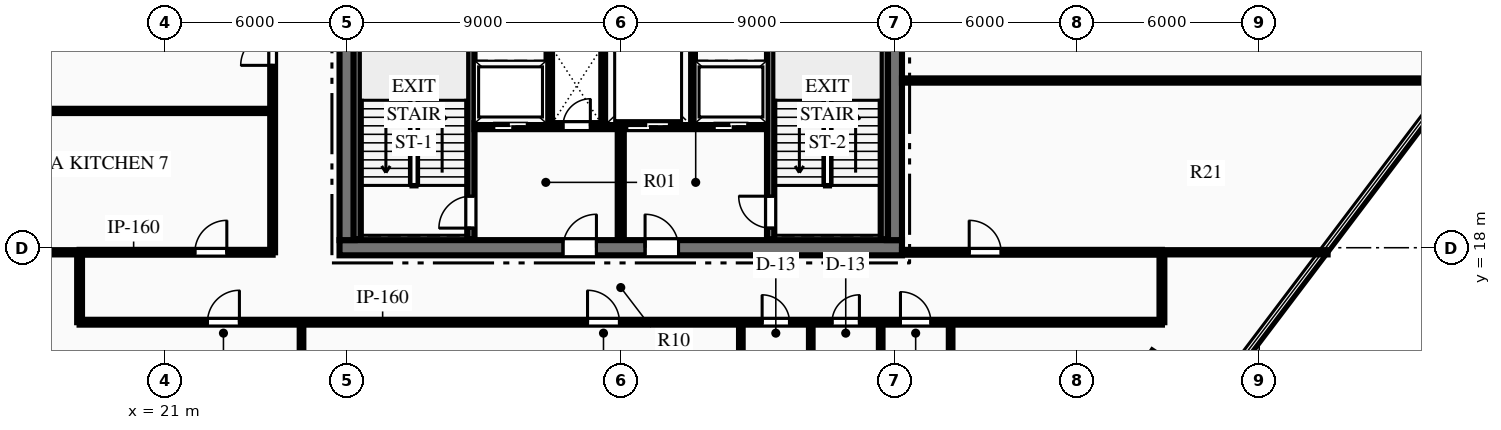
"""IFC4 building model, lengths in metres.
Left out: names, types, materials, properties, quantities, classifications, styles, units other than length and angle.
Written with IfcOpenShell. Run it as: python <this file> out.ifc"""

import sys

from ifc_helpers import new_model, si_unit, direction, frame, frame_2d, origin, place, context, subcontext, project, spatial, rectangle, extrude, element, fill, save


model = new_model("IFC4")
c1 = context("Model", 3, precision=1e-05, world=origin(), true_north=direction((0.0, 1.0)))
c2 = subcontext(c1, "Body", "Model", "MODEL_VIEW")
j1 = project(units=[si_unit("LENGTHUNIT", "METRE"), si_unit("PLANEANGLEUNIT", "RADIAN")], contexts=[c1])
p1 = place(None, origin())
s1 = spatial("IfcSite", under=j1, at=p1, CompositionType="ELEMENT")
p2 = place(p1, origin())
s2 = spatial("IfcBuilding", under=s1, at=p2, CompositionType="ELEMENT")
p3 = place(p2, frame((0.0, 0.0, 205.95)))
s3 = spatial("IfcBuildingStorey", under=s2, at=p3, CompositionType="ELEMENT", Elevation=205.95)
p4 = place(p3, frame((26.75, 18.0, 0.0), z_axis=(0.0, 0.0, 1.0), x_axis=(1.0, 0.0, 0.0)))
e1 = element("IfcWall", 1, at=p4, inside=s3, PredefinedType="SHEAR", context=c2, shape_type="SweptSolid", body=[
    extrude(rectangle(XDim=18.5, YDim=0.5, at=frame_2d((9.25, 0.0))), origin(), (0.0, 0.0, 1.0), 3.75),
])
p5 = place(p4, frame((7.35, 0.0, 0.0)))
e2 = element("IfcOpeningElement", 2, at=p5, cuts=e1, PredefinedType="OPENING", context=c2, shape_type="SweptSolid", body=[
    extrude(rectangle(XDim=1.1, YDim=2.15, at=frame_2d((0.55, 1.075))), frame((0.0, 0.26, 0.0), z_axis=(0.0, -1.0, 0.0), x_axis=(1.0, 0.0, 0.0)), (0.0, 0.0, 1.0), 0.52),
])
p6 = place(p4, frame((10.05, 0.0, 0.0)))
e3 = element("IfcOpeningElement", 3, at=p6, cuts=e1, PredefinedType="OPENING", context=c2, shape_type="SweptSolid", body=[
    extrude(rectangle(XDim=1.1, YDim=2.15, at=frame_2d((0.55, 1.075))), frame((0.0, 0.26, 0.0), z_axis=(0.0, -1.0, 0.0), x_axis=(1.0, 0.0, 0.0)), (0.0, 0.0, 1.0), 0.52),
])
p7 = place(p3, frame((27.0, 18.25, 0.0), z_axis=(0.0, 0.0, 1.0), x_axis=(0.0, 1.0, 0.0)))
e4 = element("IfcWall", 4, at=p7, inside=s3, PredefinedType="SHEAR", context=c2, shape_type="SweptSolid", body=[
    extrude(rectangle(XDim=15.5, YDim=0.5, at=frame_2d((7.75, 0.0))), origin(), (0.0, 0.0, 1.0), 3.75),
])
p8 = place(p7, frame((9.99, 0.0, 0.0)))
e5 = element("IfcOpeningElement", 5, at=p8, cuts=e4, PredefinedType="OPENING", context=c2, shape_type="SweptSolid", body=[
    extrude(rectangle(XDim=1.4, YDim=2.2, at=frame_2d((0.7, 1.1))), frame((0.0, 0.26, 0.0), z_axis=(0.0, -1.0, 0.0), x_axis=(1.0, 0.0, 0.0)), (0.0, 0.0, 1.0), 0.52),
])
p9 = place(p3, frame((45.0, 18.25, 0.0), z_axis=(0.0, 0.0, 1.0), x_axis=(0.0, 1.0, 0.0)))
e6 = element("IfcWall", 6, at=p9, inside=s3, PredefinedType="SHEAR", context=c2, shape_type="SweptSolid", body=[
    extrude(rectangle(XDim=15.5, YDim=0.5, at=frame_2d((7.75, 0.0))), origin(), (0.0, 0.0, 1.0), 3.75),
])
p10 = place(p9, frame((9.99, 0.0, 0.0)))
e7 = element("IfcOpeningElement", 7, at=p10, cuts=e6, PredefinedType="OPENING", context=c2, shape_type="SweptSolid", body=[
    extrude(rectangle(XDim=1.4, YDim=2.2, at=frame_2d((0.7, 1.1))), frame((0.0, 0.26, 0.0), z_axis=(0.0, -1.0, 0.0), x_axis=(1.0, 0.0, 0.0)), (0.0, 0.0, 1.0), 0.52),
])
p11 = place(p3, frame((31.07, 18.28, 0.0), z_axis=(0.0, 0.0, 1.0), x_axis=(0.0, 1.0, 0.0)))
e8 = element("IfcWall", 8, at=p11, inside=s3, PredefinedType="SHEAR", context=c2, shape_type="SweptSolid", body=[
    extrude(rectangle(XDim=8.26, YDim=0.24, at=frame_2d((4.13, 0.0))), origin(), (0.0, 0.0, 1.0), 3.75),
])
p12 = place(p11, frame((0.365, 0.0, 0.0)))
e9 = element("IfcOpeningElement", 9, at=p12, cuts=e8, PredefinedType="OPENING", context=c2, shape_type="SweptSolid", body=[
    extrude(rectangle(XDim=1.05, YDim=2.15, at=frame_2d((0.525, 1.075))), frame((0.0, 0.13, 0.0), z_axis=(0.0, -1.0, 0.0), x_axis=(1.0, 0.0, 0.0)), (0.0, 0.0, 1.0), 0.26),
])
p13 = place(p3, frame((27.33, 18.28, 0.0), z_axis=(0.0, 0.0, 1.0), x_axis=(0.0, 1.0, 0.0)))
e10 = element("IfcWall", 10, at=p13, inside=s3, PredefinedType="SHEAR", context=c2, shape_type="SweptSolid", body=[
    extrude(rectangle(XDim=8.26, YDim=0.24, at=frame_2d((4.13, 0.0))), origin(), (0.0, 0.0, 1.0), 3.75),
])
p14 = place(p3, frame((40.93, 18.28, 0.0), z_axis=(0.0, 0.0, 1.0), x_axis=(0.0, 1.0, 0.0)))
e11 = element("IfcWall", 11, at=p14, inside=s3, PredefinedType="SHEAR", context=c2, shape_type="SweptSolid", body=[
    extrude(rectangle(XDim=8.26, YDim=0.24, at=frame_2d((4.13, 0.0))), origin(), (0.0, 0.0, 1.0), 3.75),
])
p15 = place(p14, frame((0.365, 0.0, 0.0)))
e12 = element("IfcOpeningElement", 12, at=p15, cuts=e11, PredefinedType="OPENING", context=c2, shape_type="SweptSolid", body=[
    extrude(rectangle(XDim=1.05, YDim=2.15, at=frame_2d((0.525, 1.075))), frame((0.0, 0.13, 0.0), z_axis=(0.0, -1.0, 0.0), x_axis=(1.0, 0.0, 0.0)), (0.0, 0.0, 1.0), 0.26),
])
p16 = place(p3, frame((44.67, 18.28, 0.0), z_axis=(0.0, 0.0, 1.0), x_axis=(0.0, 1.0, 0.0)))
e13 = element("IfcWall", 13, at=p16, inside=s3, PredefinedType="SHEAR", context=c2, shape_type="SweptSolid", body=[
    extrude(rectangle(XDim=8.26, YDim=0.24, at=frame_2d((4.13, 0.0))), origin(), (0.0, 0.0, 1.0), 3.75),
])
p17 = place(p3, frame((36.0, 18.28, 0.0), z_axis=(0.0, 0.0, 1.0), x_axis=(0.0, 1.0, 0.0)))
e14 = element("IfcWall", 14, at=p17, inside=s3, PredefinedType="PARTITIONING", context=c2, shape_type="SweptSolid", body=[
    extrude(rectangle(XDim=3.77, YDim=0.2, at=frame_2d((1.885, 0.0))), origin(), (0.0, 0.0, 1.0), 3.47),
])
p18 = place(p3, frame((31.19, 22.0, 0.0), z_axis=(0.0, 0.0, 1.0), x_axis=(1.0, 0.0, 0.0)))
e15 = element("IfcWall", 15, at=p18, inside=s3, PredefinedType="PARTITIONING", context=c2, shape_type="SweptSolid", body=[
    extrude(rectangle(XDim=4.69, YDim=0.2, at=frame_2d((2.345, 0.0))), origin(), (0.0, 0.0, 1.0), 3.47),
])
p19 = place(p18, frame((2.91, 0.0, 0.0)))
e16 = element("IfcOpeningElement", 16, at=p19, cuts=e15, PredefinedType="OPENING", context=c2, shape_type="SweptSolid", body=[
    extrude(rectangle(XDim=0.9, YDim=2.15, at=frame_2d((0.45, 1.075))), frame((0.0, 0.11, 0.0), z_axis=(0.0, -1.0, 0.0), x_axis=(1.0, 0.0, 0.0)), (0.0, 0.0, 1.0), 0.22),
])
p20 = place(p18, frame((0.635, 0.0, 0.0)))
e17 = element("IfcOpeningElement", 17, at=p20, cuts=e15, PredefinedType="OPENING", context=c2, shape_type="SweptSolid", body=[
    extrude(rectangle(XDim=1.1, YDim=2.15, at=frame_2d((0.55, 1.075))), frame((0.0, 0.11, 0.0), z_axis=(0.0, -1.0, 0.0), x_axis=(1.0, 0.0, 0.0)), (0.0, 0.0, 1.0), 0.22),
])
p21 = place(p3, frame((36.12, 22.0, 0.0), z_axis=(0.0, 0.0, 1.0), x_axis=(1.0, 0.0, 0.0)))
e18 = element("IfcWall", 18, at=p21, inside=s3, PredefinedType="PARTITIONING", context=c2, shape_type="SweptSolid", body=[
    extrude(rectangle(XDim=4.69, YDim=0.2, at=frame_2d((2.345, 0.0))), origin(), (0.0, 0.0, 1.0), 3.47),
])
p22 = place(p21, frame((2.955, 0.0, 0.0)))
e19 = element("IfcOpeningElement", 19, at=p22, cuts=e18, PredefinedType="OPENING", context=c2, shape_type="SweptSolid", body=[
    extrude(rectangle(XDim=1.1, YDim=2.15, at=frame_2d((0.55, 1.075))), frame((0.0, 0.11, 0.0), z_axis=(0.0, -1.0, 0.0), x_axis=(1.0, 0.0, 0.0)), (0.0, 0.0, 1.0), 0.22),
])
p23 = place(p21, frame((0.08, 0.0, 0.0)))
e20 = element("IfcOpeningElement", 20, at=p23, cuts=e18, PredefinedType="OPENING", context=c2, shape_type="SweptSolid", body=[
    extrude(rectangle(XDim=1.4, YDim=2.2, at=frame_2d((0.7, 1.1))), frame((0.0, 0.11, 0.0), z_axis=(0.0, -1.0, 0.0), x_axis=(1.0, 0.0, 0.0)), (0.0, 0.0, 1.0), 0.22),
])
for number, where, z_axis, x_axis in (
    (21, (33.65, 22.05, 0.0), (0.0, 0.0, 1.0), (0.0, 1.0, 0.0)),
    (22, (35.45, 22.05, 0.0), (0.0, 0.0, 1.0), (0.0, 1.0, 0.0)),
    (23, (38.35, 22.05, 0.0), (0.0, 0.0, 1.0), (0.0, 1.0, 0.0)),
):
    element("IfcWall", number, at=place(p3, frame(where, z_axis=z_axis, x_axis=x_axis)), inside=s3, PredefinedType="PARTITIONING", context=c2, shape_type="SweptSolid", body=[
        extrude(rectangle(XDim=2.6, YDim=0.18, at=frame_2d((1.3, 0.0))), origin(), (0.0, 0.0, 1.0), 3.47),
    ])
p24 = place(p3, frame((18.2, 15.55, 0.0), z_axis=(0.0, 0.0, 1.0), x_axis=(1.0, 0.0, 0.0)))
e24 = element("IfcWall", 24, at=p24, inside=s3, PredefinedType="PARTITIONING", context=c2, shape_type="SweptSolid", body=[
    extrude(rectangle(XDim=35.6, YDim=0.16, at=frame_2d((17.8, 0.0))), origin(), (0.0, 0.0, 1.0), 2.849),
])
p25 = place(p24, frame((22.45, 0.0, 0.0)))
e25 = element("IfcOpeningElement", 25, at=p25, cuts=e24, PredefinedType="OPENING", context=c2, shape_type="SweptSolid", body=[
    extrude(rectangle(XDim=0.9, YDim=2.15, at=frame_2d((0.45, 1.075))), frame((0.0, 0.09, 0.0), z_axis=(0.0, -1.0, 0.0), x_axis=(1.0, 0.0, 0.0)), (0.0, 0.0, 1.0), 0.18),
])
p26 = place(p24, frame((24.75, 0.0, 0.0)))
e26 = element("IfcOpeningElement", 26, at=p26, cuts=e24, PredefinedType="OPENING", context=c2, shape_type="SweptSolid", body=[
    extrude(rectangle(XDim=0.9, YDim=2.15, at=frame_2d((0.45, 1.075))), frame((0.0, 0.09, 0.0), z_axis=(0.0, -1.0, 0.0), x_axis=(1.0, 0.0, 0.0)), (0.0, 0.0, 1.0), 0.18),
])
p27 = place(p24, frame((27.0, 0.0, 0.0)))
e27 = element("IfcOpeningElement", 27, at=p27, cuts=e24, PredefinedType="OPENING", context=c2, shape_type="SweptSolid", body=[
    extrude(rectangle(XDim=1.0, YDim=2.15, at=frame_2d((0.5, 1.075))), frame((0.0, 0.09, 0.0), z_axis=(0.0, -1.0, 0.0), x_axis=(1.0, 0.0, 0.0)), (0.0, 0.0, 1.0), 0.18),
])
p28 = place(p24, frame((4.207, 0.0, 0.0)))
e28 = element("IfcOpeningElement", 28, at=p28, cuts=e24, PredefinedType="OPENING", context=c2, shape_type="SweptSolid", body=[
    extrude(rectangle(XDim=1.05, YDim=2.15, at=frame_2d((0.525, 1.075))), frame((0.0, 0.09, 0.0), z_axis=(0.0, -1.0, 0.0), x_axis=(1.0, 0.0, 0.0)), (0.0, 0.0, 1.0), 0.18),
])
p29 = place(p24, frame((16.707, 0.0, 0.0)))
e29 = element("IfcOpeningElement", 29, at=p29, cuts=e24, PredefinedType="OPENING", context=c2, shape_type="SweptSolid", body=[
    extrude(rectangle(XDim=1.05, YDim=2.15, at=frame_2d((0.525, 1.075))), frame((0.0, 0.09, 0.0), z_axis=(0.0, -1.0, 0.0), x_axis=(1.0, 0.0, 0.0)), (0.0, 0.0, 1.0), 0.18),
])
p30 = place(p3, frame((18.2, 17.85, 0.0), z_axis=(0.0, 0.0, 1.0), x_axis=(1.0, 0.0, 0.0)))
e30 = element("IfcWall", 30, at=p30, inside=s3, PredefinedType="PARTITIONING", context=c2, shape_type="SweptSolid", body=[
    extrude(rectangle(XDim=6.35, YDim=0.16, at=frame_2d((3.175, 0.0))), origin(), (0.0, 0.0, 1.0), 3.47),
])
p31 = place(p30, frame((3.793, 0.0, 0.0)))
e31 = element("IfcOpeningElement", 31, at=p31, cuts=e30, PredefinedType="OPENING", context=c2, shape_type="SweptSolid", body=[
    extrude(rectangle(XDim=1.05, YDim=2.15, at=frame_2d((0.525, 1.075))), frame((0.0, 0.09, 0.0), z_axis=(0.0, -1.0, 0.0), x_axis=(1.0, 0.0, 0.0)), (0.0, 0.0, 1.0), 0.18),
])
p32 = place(p3, frame((45.25, 17.85, 0.0), z_axis=(0.0, 0.0, 1.0), x_axis=(1.0, 0.0, 0.0)))
e32 = element("IfcWall", 32, at=p32, inside=s3, PredefinedType="PARTITIONING", context=c2, shape_type="SweptSolid", body=[
    extrude(rectangle(XDim=8.55, YDim=0.16, at=frame_2d((4.275, 0.0))), origin(), (0.0, 0.0, 1.0), 3.47),
])
p33 = place(p32, frame((2.211, 0.0, 0.0)))
e33 = element("IfcOpeningElement", 33, at=p33, cuts=e32, PredefinedType="OPENING", context=c2, shape_type="SweptSolid", body=[
    extrude(rectangle(XDim=1.05, YDim=2.15, at=frame_2d((0.525, 1.075))), frame((0.0, 0.09, 0.0), z_axis=(0.0, -1.0, 0.0), x_axis=(1.0, 0.0, 0.0)), (0.0, 0.0, 1.0), 0.18),
])
p34 = place(p3, frame((24.55, 17.85, 0.0), z_axis=(0.0, 0.0, 1.0), x_axis=(0.0, 1.0, 0.0)))
e34 = element("IfcWall", 34, at=p34, inside=s3, PredefinedType="PARTITIONING", context=c2, shape_type="SweptSolid", body=[
    extrude(rectangle(XDim=16.3, YDim=0.16, at=frame_2d((8.15, 0.0))), origin(), (0.0, 0.0, 1.0), 3.47),
])
p35 = place(p34, frame((6.149, 0.0, 0.0)))
e35 = element("IfcOpeningElement", 35, at=p35, cuts=e34, PredefinedType="OPENING", context=c2, shape_type="SweptSolid", body=[
    extrude(rectangle(XDim=1.05, YDim=2.15, at=frame_2d((0.525, 1.075))), frame((0.0, 0.09, 0.0), z_axis=(0.0, -1.0, 0.0), x_axis=(1.0, 0.0, 0.0)), (0.0, 0.0, 1.0), 0.18),
])
for number, where, z_axis, x_axis in (
    (36, (18.2, 15.55, 0.0), (0.0, 0.0, 1.0), (0.0, 1.0, 0.0)),
    (37, (53.8, 15.55, 0.0), (0.0, 0.0, 1.0), (0.0, 1.0, 0.0)),
):
    element("IfcWall", number, at=place(p3, frame(where, z_axis=z_axis, x_axis=x_axis)), inside=s3, PredefinedType="PARTITIONING", context=c2, shape_type="SweptSolid", body=[
        extrude(rectangle(XDim=2.3, YDim=0.16, at=frame_2d((1.15, 0.0))), origin(), (0.0, 0.0, 1.0), 3.47),
    ])
for number, where, z_axis, x_axis in (
    (38, (39.95, 11.65, 0.0), (0.0, 0.0, 1.0), (0.0, 1.0, 0.0)),
    (39, (42.25, 11.65, 0.0), (0.0, 0.0, 1.0), (0.0, 1.0, 0.0)),
    (40, (44.55, 11.65, 0.0), (0.0, 0.0, 1.0), (0.0, 1.0, 0.0)),
    (41, (46.85, 11.65, 0.0), (0.0, 0.0, 1.0), (0.0, 1.0, 0.0)),
):
    element("IfcWall", number, at=place(p3, frame(where, z_axis=z_axis, x_axis=x_axis)), inside=s3, PredefinedType="PARTITIONING", context=c2, shape_type="SweptSolid", body=[
        extrude(rectangle(XDim=3.9, YDim=0.12, at=frame_2d((1.95, 0.0))), origin(), (0.0, 0.0, 1.0), 3.47),
    ])
p36 = place(p3, frame((6.558, 17.85, 0.0), z_axis=(0.0, 0.0, 1.0), x_axis=(1.0, 0.0, 0.0)))
e42 = element("IfcWall", 42, at=p36, inside=s3, PredefinedType="PARTITIONING", context=c2, shape_type="SweptSolid", body=[
    extrude(rectangle(XDim=11.642, YDim=0.14, at=frame_2d((5.821, 0.0))), origin(), (0.0, 0.0, 1.0), 3.47),
])
p37 = place(p3, frame((53.8, 17.85, 0.0), z_axis=(0.0, 0.0, 1.0), x_axis=(1.0, 0.0, 0.0)))
e43 = element("IfcWall", 43, at=p37, inside=s3, PredefinedType="PARTITIONING", context=c2, shape_type="SweptSolid", body=[
    extrude(rectangle(XDim=5.45, YDim=0.14, at=frame_2d((2.725, 0.0))), origin(), (0.0, 0.0, 1.0), 3.47),
])
p38 = place(p3, frame((25.5, 3.524, 0.0), z_axis=(0.0, 0.0, 1.0), x_axis=(0.0, 1.0, 0.0)))
e44 = element("IfcWall", 44, at=p38, inside=s3, PredefinedType="PARTITIONING", context=c2, shape_type="SweptSolid", body=[
    extrude(rectangle(XDim=12.026, YDim=0.12, at=frame_2d((6.013, 0.0))), origin(), (0.0, 0.0, 1.0), 2.849),
])
p39 = place(p3, frame((6.875, 22.5, 0.0), z_axis=(0.0, 0.0, 1.0), x_axis=(1.0, 0.0, 0.0)))
e45 = element("IfcWall", 45, at=p39, inside=s3, PredefinedType="PARTITIONING", context=c2, shape_type="SweptSolid", body=[
    extrude(rectangle(XDim=17.675, YDim=0.14, at=frame_2d((8.837, 0.0))), origin(), (0.0, 0.0, 1.0), 3.47),
])
p40 = place(p3, frame((45.25, 23.5, 0.0), z_axis=(0.0, 0.0, 1.0), x_axis=(1.0, 0.0, 0.0)))
e46 = element("IfcWall", 46, at=p40, inside=s3, PredefinedType="PARTITIONING", context=c2, shape_type="SweptSolid", body=[
    extrude(rectangle(XDim=18.273, YDim=0.14, at=frame_2d((9.137, 0.0))), origin(), (0.0, 0.0, 1.0), 3.47),
])
p41 = place(p12, origin())
e47 = element("IfcDoor", 47, at=p41, inside=s3, OperationType="SINGLE_SWING_LEFT", PredefinedType="DOOR", context=c2, shape_type="SweptSolid", body=[
    extrude(rectangle(XDim=1.05, YDim=2.15, at=frame_2d((0.525, 1.075))), frame((0.0, 0.025, 0.0), z_axis=(0.0, -1.0, 0.0), x_axis=(1.0, 0.0, 0.0)), (0.0, 0.0, 1.0), 0.05),
])
fill(e9, e47)
p42 = place(p15, origin())
e48 = element("IfcDoor", 48, at=p42, inside=s3, OperationType="SINGLE_SWING_RIGHT", PredefinedType="DOOR", context=c2, shape_type="SweptSolid", body=[
    extrude(rectangle(XDim=1.05, YDim=2.15, at=frame_2d((0.525, 1.075))), frame((0.0, 0.025, 0.0), z_axis=(0.0, -1.0, 0.0), x_axis=(1.0, 0.0, 0.0)), (0.0, 0.0, 1.0), 0.05),
])
fill(e12, e48)
p43 = place(p5, origin())
e49 = element("IfcDoor", 49, at=p43, inside=s3, OperationType="SINGLE_SWING_RIGHT", PredefinedType="DOOR", context=c2, shape_type="SweptSolid", body=[
    extrude(rectangle(XDim=1.1, YDim=2.15, at=frame_2d((0.55, 1.075))), frame((0.0, 0.025, 0.0), z_axis=(0.0, -1.0, 0.0), x_axis=(1.0, 0.0, 0.0)), (0.0, 0.0, 1.0), 0.05),
])
fill(e2, e49)
p44 = place(p6, origin())
e50 = element("IfcDoor", 50, at=p44, inside=s3, OperationType="SINGLE_SWING_LEFT", PredefinedType="DOOR", context=c2, shape_type="SweptSolid", body=[
    extrude(rectangle(XDim=1.1, YDim=2.15, at=frame_2d((0.55, 1.075))), frame((0.0, 0.025, 0.0), z_axis=(0.0, -1.0, 0.0), x_axis=(1.0, 0.0, 0.0)), (0.0, 0.0, 1.0), 0.05),
])
fill(e3, e50)
p45 = place(p19, origin())
e51 = element("IfcDoor", 51, at=p45, inside=s3, OperationType="SINGLE_SWING_RIGHT", PredefinedType="DOOR", context=c2, shape_type="SweptSolid", body=[
    extrude(rectangle(XDim=0.9, YDim=2.15, at=frame_2d((0.45, 1.075))), frame((0.0, 0.025, 0.0), z_axis=(0.0, -1.0, 0.0), x_axis=(1.0, 0.0, 0.0)), (0.0, 0.0, 1.0), 0.05),
])
fill(e16, e51)
p46 = place(p25, origin())
e52 = element("IfcDoor", 52, at=p46, inside=s3, OperationType="SINGLE_SWING_LEFT", PredefinedType="DOOR", context=c2, shape_type="SweptSolid", body=[
    extrude(rectangle(XDim=0.9, YDim=2.15, at=frame_2d((0.45, 1.075))), frame((0.0, 0.025, 0.0), z_axis=(0.0, -1.0, 0.0), x_axis=(1.0, 0.0, 0.0)), (0.0, 0.0, 1.0), 0.05),
])
fill(e25, e52)
p47 = place(p26, origin())
e53 = element("IfcDoor", 53, at=p47, inside=s3, OperationType="SINGLE_SWING_RIGHT", PredefinedType="DOOR", context=c2, shape_type="SweptSolid", body=[
    extrude(rectangle(XDim=0.9, YDim=2.15, at=frame_2d((0.45, 1.075))), frame((0.0, 0.025, 0.0), z_axis=(0.0, -1.0, 0.0), x_axis=(1.0, 0.0, 0.0)), (0.0, 0.0, 1.0), 0.05),
])
fill(e26, e53)
p48 = place(p27, origin())
e54 = element("IfcDoor", 54, at=p48, inside=s3, OperationType="SINGLE_SWING_LEFT", PredefinedType="DOOR", context=c2, shape_type="SweptSolid", body=[
    extrude(rectangle(XDim=1.0, YDim=2.15, at=frame_2d((0.5, 1.075))), frame((0.0, 0.025, 0.0), z_axis=(0.0, -1.0, 0.0), x_axis=(1.0, 0.0, 0.0)), (0.0, 0.0, 1.0), 0.05),
])
fill(e27, e54)
p49 = place(p28, origin())
e55 = element("IfcDoor", 55, at=p49, inside=s3, OperationType="SINGLE_SWING_RIGHT", PredefinedType="DOOR", context=c2, shape_type="SweptSolid", body=[
    extrude(rectangle(XDim=1.05, YDim=2.15, at=frame_2d((0.525, 1.075))), frame((0.0, 0.025, 0.0), z_axis=(0.0, -1.0, 0.0), x_axis=(1.0, 0.0, 0.0)), (0.0, 0.0, 1.0), 0.05),
])
fill(e28, e55)
p50 = place(p29, origin())
e56 = element("IfcDoor", 56, at=p50, inside=s3, OperationType="SINGLE_SWING_LEFT", PredefinedType="DOOR", context=c2, shape_type="SweptSolid", body=[
    extrude(rectangle(XDim=1.05, YDim=2.15, at=frame_2d((0.525, 1.075))), frame((0.0, 0.025, 0.0), z_axis=(0.0, -1.0, 0.0), x_axis=(1.0, 0.0, 0.0)), (0.0, 0.0, 1.0), 0.05),
])
fill(e29, e56)
p51 = place(p31, origin())
e57 = element("IfcDoor", 57, at=p51, inside=s3, OperationType="SINGLE_SWING_RIGHT", PredefinedType="DOOR", context=c2, shape_type="SweptSolid", body=[
    extrude(rectangle(XDim=1.05, YDim=2.15, at=frame_2d((0.525, 1.075))), frame((0.0, 0.025, 0.0), z_axis=(0.0, -1.0, 0.0), x_axis=(1.0, 0.0, 0.0)), (0.0, 0.0, 1.0), 0.05),
])
fill(e31, e57)
p52 = place(p35, origin())
e58 = element("IfcDoor", 58, at=p52, inside=s3, OperationType="SINGLE_SWING_LEFT", PredefinedType="DOOR", context=c2, shape_type="SweptSolid", body=[
    extrude(rectangle(XDim=1.05, YDim=2.15, at=frame_2d((0.525, 1.075))), frame((0.0, 0.025, 0.0), z_axis=(0.0, -1.0, 0.0), x_axis=(1.0, 0.0, 0.0)), (0.0, 0.0, 1.0), 0.05),
])
fill(e35, e58)
p53 = place(p33, origin())
e59 = element("IfcDoor", 59, at=p53, inside=s3, OperationType="SINGLE_SWING_LEFT", PredefinedType="DOOR", context=c2, shape_type="SweptSolid", body=[
    extrude(rectangle(XDim=1.05, YDim=2.15, at=frame_2d((0.525, 1.075))), frame((0.0, 0.025, 0.0), z_axis=(0.0, -1.0, 0.0), x_axis=(1.0, 0.0, 0.0)), (0.0, 0.0, 1.0), 0.05),
])
fill(e33, e59)
p54 = place(p20, origin())
e60 = element("IfcDoor", 60, at=p54, inside=s3, OperationType="SLIDING_TO_LEFT", PredefinedType="DOOR", context=c2, shape_type="SweptSolid", body=[
    extrude(rectangle(XDim=1.1, YDim=2.15, at=frame_2d((0.55, 1.075))), frame((0.0, 0.025, 0.0), z_axis=(0.0, -1.0, 0.0), x_axis=(1.0, 0.0, 0.0)), (0.0, 0.0, 1.0), 0.05),
])
fill(e17, e60)
p55 = place(p22, origin())
e61 = element("IfcDoor", 61, at=p55, inside=s3, OperationType="SLIDING_TO_LEFT", PredefinedType="DOOR", context=c2, shape_type="SweptSolid", body=[
    extrude(rectangle(XDim=1.1, YDim=2.15, at=frame_2d((0.55, 1.075))), frame((0.0, 0.025, 0.0), z_axis=(0.0, -1.0, 0.0), x_axis=(1.0, 0.0, 0.0)), (0.0, 0.0, 1.0), 0.05),
])
fill(e19, e61)
p56 = place(p23, origin())
e62 = element("IfcDoor", 62, at=p56, inside=s3, OperationType="SLIDING_TO_LEFT", PredefinedType="DOOR", context=c2, shape_type="SweptSolid", body=[
    extrude(rectangle(XDim=1.4, YDim=2.2, at=frame_2d((0.7, 1.1))), frame((0.0, 0.025, 0.0), z_axis=(0.0, -1.0, 0.0), x_axis=(1.0, 0.0, 0.0)), (0.0, 0.0, 1.0), 0.05),
])
fill(e20, e62)
save(model, sys.argv[1])
